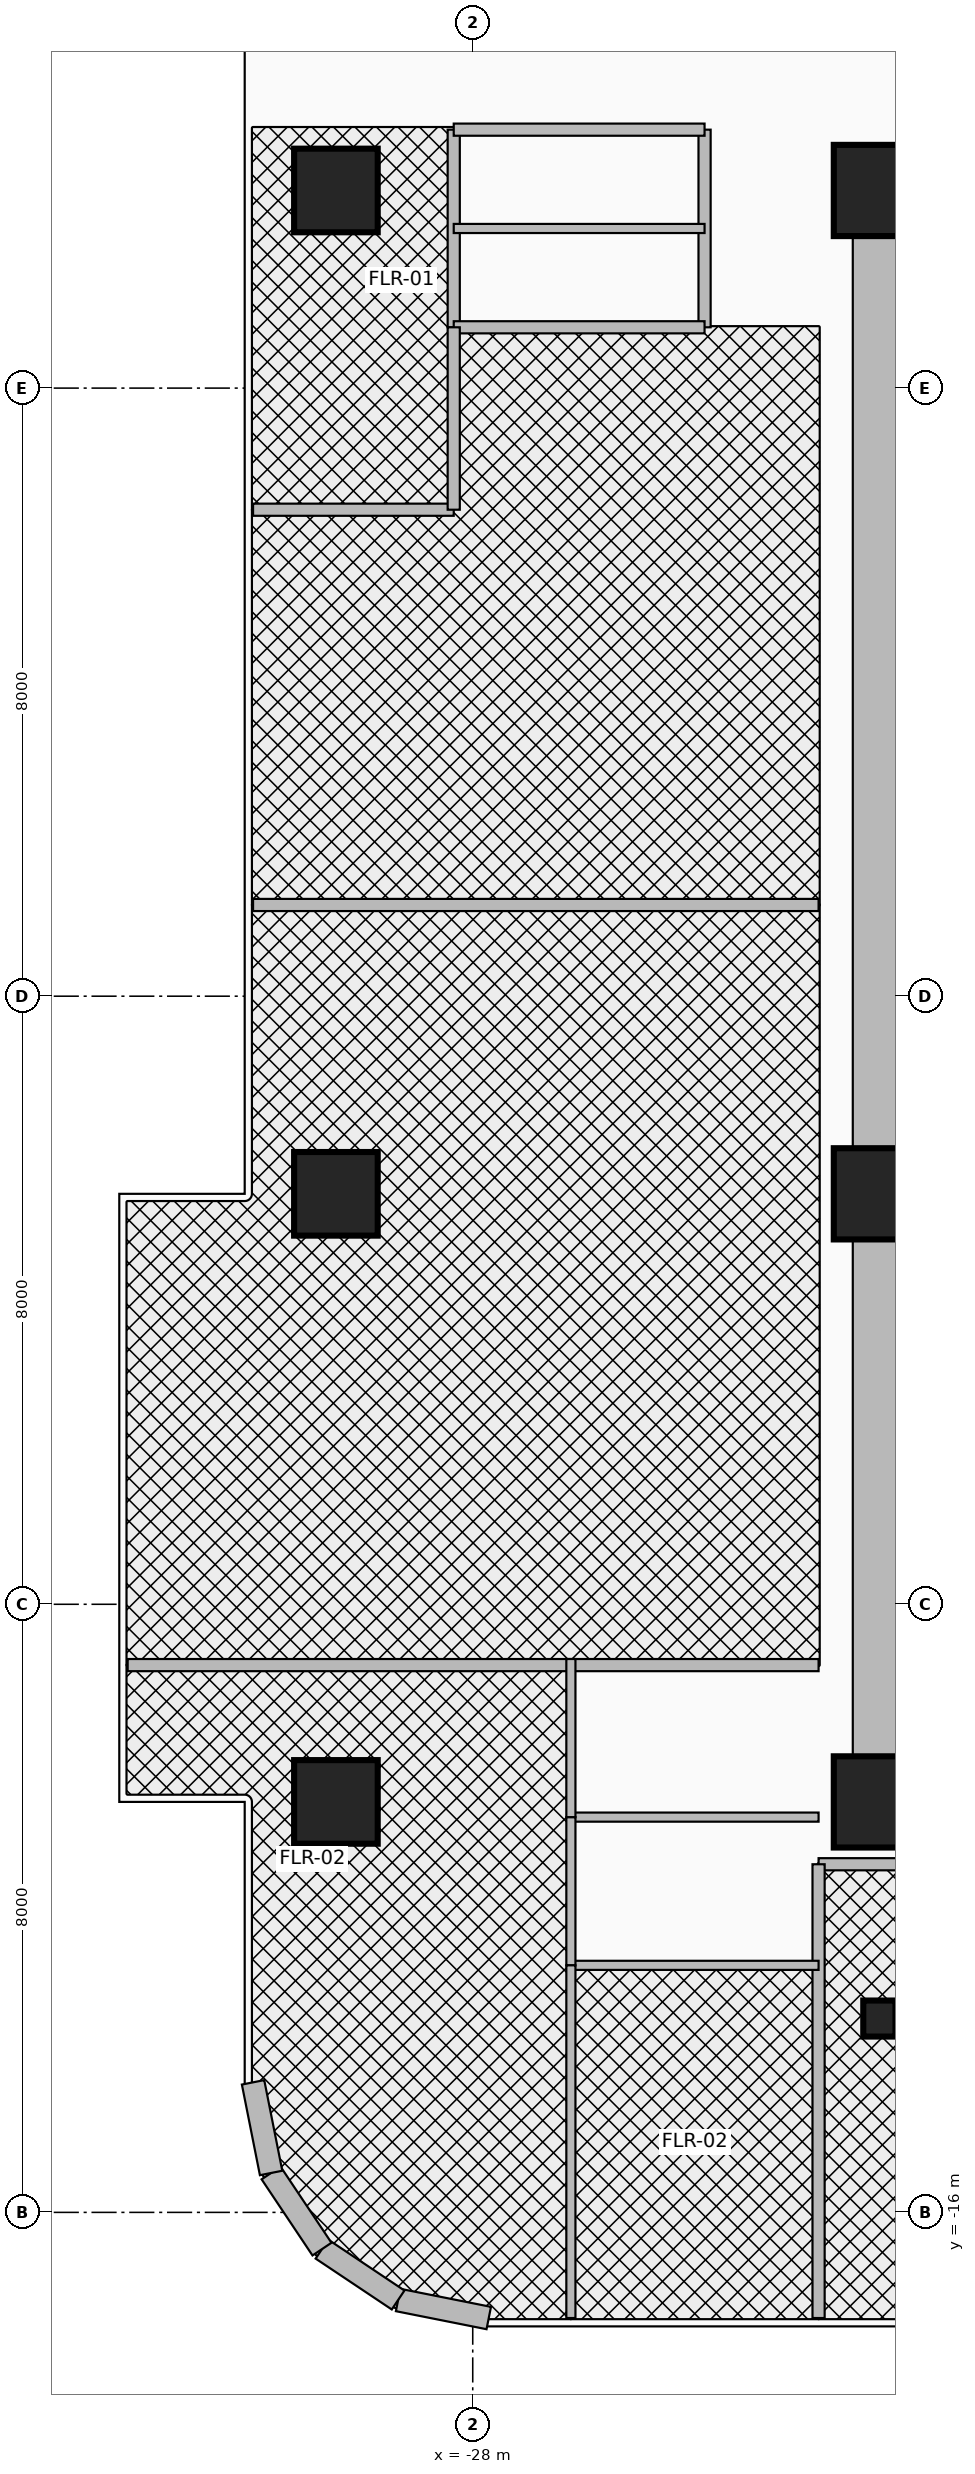
"""IFC4 building model, lengths in metres.
Left out: names, types, materials, properties, quantities, classifications, styles, units other than length and angle.
Written with IfcOpenShell. Run it as: python <this file> out.ifc"""

import sys

from ifc_helpers import new_model, si_unit, direction, frame, frame_2d, origin, origin_2d, place, context, subcontext, project, spatial, rectangle, circle, i_section, extrude, source, transform, mapped, element, fill, save


model = new_model("IFC4")
c1 = context("Model", 3, precision=1e-05, world=origin(), true_north=direction((0.0, 1.0)))
c2 = subcontext(c1, "Body", "Model", "MODEL_VIEW")
j1 = project(units=[si_unit("LENGTHUNIT", "METRE"), si_unit("PLANEANGLEUNIT", "RADIAN")], contexts=[c1])
p1 = place(None, origin())
s1 = spatial("IfcSite", under=j1, at=p1, CompositionType="ELEMENT")
p2 = place(p1, origin())
s2 = spatial("IfcBuilding", under=s1, at=p2, CompositionType="ELEMENT")
p3 = place(p2, frame((0.0, 0.0, 131.6)))
s3 = spatial("IfcBuildingStorey", under=s2, at=p3, CompositionType="ELEMENT", Elevation=131.6)
p4 = place(p3, frame((-22.65, -11.15, 0.0), z_axis=(0.0, 0.0, 1.0), x_axis=(0.0, 1.0, 0.0)))
e1 = element("IfcWall", 1, at=p4, inside=s3, PredefinedType="SHEAR", context=c2, shape_type="SweptSolid", body=[
    extrude(rectangle(XDim=22.3, YDim=0.7, at=frame_2d((11.15, 0.0))), origin(), (0.0, 0.0, 1.0), 3.46),
])
for number, where, z_axis, x_axis in (
    (2, (-22.65, 10.8, 0.0), (0.0, 0.0, 1.0), (1.0, 0.0, 0.0)),
    (3, (-22.65, -10.8, 0.0), (0.0, 0.0, 1.0), (1.0, 0.0, 0.0)),
):
    element("IfcWall", number, at=place(p3, frame(where, z_axis=z_axis, x_axis=x_axis)), inside=s3, PredefinedType="SHEAR", context=c2, shape_type="SweptSolid", body=[
        extrude(rectangle(XDim=10.25, YDim=0.7, at=frame_2d((5.125, 0.0))), origin(), (0.0, 0.0, 1.0), 3.46),
    ])
m1 = source(origin(), c2, "Body", "SweptSolid", [
    extrude(circle(Radius=0.55, at=origin_2d()), origin(), (0.0, 0.0, 1.0), 3.7),
])
p5 = place(p3, frame((-29.8, -10.6, 0.0), z_axis=(0.0, 0.0, 1.0), x_axis=(1.0, 0.0, 0.0)))
e4 = element("IfcColumn", 4, at=p5, inside=s3, PredefinedType="COLUMN", context=c2, shape_type="MappedRepresentation", body=[
    mapped(m1, transform((0.0, 0.0, 0.0), x_axis=(1.0, 0.0, 0.0), y_axis=(0.0, 1.0, 0.0), z_axis=(0.0, 0.0, 1.0), scale=1.0)),
])
m2 = source(origin(), c2, "Body", "SweptSolid", [
    extrude(rectangle(XDim=1.2, YDim=1.2, at=origin_2d()), origin(), (0.0, 0.0, 1.0), 3.7),
])
p6 = place(p3, frame((-22.65, -10.6, 0.0), z_axis=(0.0, 0.0, 1.0), x_axis=(1.0, 0.0, 0.0)))
e5 = element("IfcColumn", 5, at=p6, inside=s3, PredefinedType="COLUMN", context=c2, shape_type="MappedRepresentation", body=[
    mapped(m2, transform((0.0, 0.0, 0.0), x_axis=(1.0, 0.0, 0.0), y_axis=(0.0, 1.0, 0.0), z_axis=(0.0, 0.0, 1.0), scale=1.0)),
])
p7 = place(p3, frame((-29.8, -2.6, 0.0), z_axis=(0.0, 0.0, 1.0), x_axis=(1.0, 0.0, 0.0)))
e6 = element("IfcColumn", 6, at=p7, inside=s3, PredefinedType="COLUMN", context=c2, shape_type="MappedRepresentation", body=[
    mapped(m1, transform((0.0, 0.0, 0.0), x_axis=(1.0, 0.0, 0.0), y_axis=(0.0, 1.0, 0.0), z_axis=(0.0, 0.0, 1.0), scale=1.0)),
])
p8 = place(p3, frame((-22.65, -2.6, 0.0), z_axis=(0.0, 0.0, 1.0), x_axis=(1.0, 0.0, 0.0)))
e7 = element("IfcColumn", 7, at=p8, inside=s3, PredefinedType="COLUMN", context=c2, shape_type="MappedRepresentation", body=[
    mapped(m2, transform((0.0, 0.0, 0.0), x_axis=(1.0, 0.0, 0.0), y_axis=(0.0, 1.0, 0.0), z_axis=(0.0, 0.0, 1.0), scale=1.0)),
])
p9 = place(p3, frame((-29.8, 10.6, 0.0), z_axis=(0.0, 0.0, 1.0), x_axis=(1.0, 0.0, 0.0)))
e8 = element("IfcColumn", 8, at=p9, inside=s3, PredefinedType="COLUMN", context=c2, shape_type="MappedRepresentation", body=[
    mapped(m1, transform((0.0, 0.0, 0.0), x_axis=(1.0, 0.0, 0.0), y_axis=(0.0, 1.0, 0.0), z_axis=(0.0, 0.0, 1.0), scale=1.0)),
])
p10 = place(p3, frame((-22.65, 10.6, 0.0), z_axis=(0.0, 0.0, 1.0), x_axis=(1.0, 0.0, 0.0)))
e9 = element("IfcColumn", 9, at=p10, inside=s3, PredefinedType="COLUMN", context=c2, shape_type="MappedRepresentation", body=[
    mapped(m2, transform((0.0, 0.0, 0.0), x_axis=(1.0, 0.0, 0.0), y_axis=(0.0, 1.0, 0.0), z_axis=(0.0, 0.0, 1.0), scale=1.0)),
])
m3 = source(origin(), c2, "Body", "SweptSolid", [
    extrude(i_section(OverallWidth=0.424, OverallDepth=0.474, WebThickness=0.048, FlangeThickness=0.077, at=origin_2d()), origin(), (0.0, 0.0, 1.0), 3.7),
])
p11 = place(p3, frame((-22.65, -13.45, 0.0), z_axis=(0.0, 0.0, 1.0), x_axis=(1.0, 0.0, 0.0)))
e10 = element("IfcColumn", 10, at=p11, inside=s3, PredefinedType="COLUMN", context=c2, shape_type="MappedRepresentation", body=[
    mapped(m3, transform((0.0, 0.0, 0.0), x_axis=(1.0, 0.0, 0.0), y_axis=(0.0, 1.0, 0.0), z_axis=(0.0, 0.0, 1.0), scale=1.0)),
])
p12 = place(p3, frame((-27.789, -17.39, 0.0), z_axis=(0.0, 0.0, 1.0), x_axis=(-0.980804027463, 0.194996050505, 0.0)))
e11 = element("IfcWall", 11, at=p12, inside=s3, PredefinedType="SOLIDWALL", context=c2, shape_type="SweptSolid", body=[
    extrude(rectangle(XDim=1.216, YDim=0.3, at=frame_2d((0.608, 0.0))), origin(), (0.0, 0.0, 1.0), 3.46),
])
for number, where, z_axis, x_axis in (
    (12, (-28.982, -17.153, 0.0), (0.0, 0.0, 1.0), (-0.831, 0.556, 0.0)),
    (13, (-29.983, -16.483, 0.0), (0.0, 0.0, 1.0), (-0.556, 0.831, 0.0)),
):
    element("IfcWall", number, at=place(p3, frame(where, z_axis=z_axis, x_axis=x_axis)), inside=s3, PredefinedType="SOLIDWALL", context=c2, shape_type="SweptSolid", body=[
        extrude(rectangle(XDim=1.205, YDim=0.3, at=frame_2d((0.603, 0.0))), origin(), (0.0, 0.0, 1.0), 3.46),
    ])
p13 = place(p3, frame((-30.653, -15.482, 0.0), z_axis=(0.0, 0.0, 1.0), x_axis=(-0.194996050505, 0.980804027463, 0.0)))
e14 = element("IfcWall", 14, at=p13, inside=s3, PredefinedType="SOLIDWALL", context=c2, shape_type="SweptSolid", body=[
    extrude(rectangle(XDim=1.216, YDim=0.3, at=frame_2d((0.608, 0.0))), origin(), (0.0, 0.0, 1.0), 3.46),
])
p14 = place(p3, frame((-28.25, 8.8, 0.0), z_axis=(0.0, 0.0, 1.0), x_axis=(0.0, 1.0, 0.0)))
e15 = element("IfcWall", 15, at=p14, inside=s3, PredefinedType="PARTITIONING", context=c2, shape_type="SweptSolid", body=[
    extrude(rectangle(XDim=2.6, YDim=0.16, at=frame_2d((1.3, 0.0))), origin(), (0.0, 0.0, 1.0), 2.666),
])
p15 = place(p3, frame((-24.95, 8.8, 0.0), z_axis=(0.0, 0.0, 1.0), x_axis=(0.0, 1.0, 0.0)))
e16 = element("IfcWall", 16, at=p15, inside=s3, PredefinedType="PARTITIONING", context=c2, shape_type="SweptSolid", body=[
    extrude(rectangle(XDim=2.6, YDim=0.16, at=frame_2d((1.3, 0.0))), origin(), (0.0, 0.0, 1.0), 2.666),
])
p16 = place(p15, frame((0.3, 0.0, 0.0)))
e17 = element("IfcOpeningElement", 17, at=p16, cuts=e16, PredefinedType="OPENING", context=c2, shape_type="SweptSolid", body=[
    extrude(rectangle(XDim=0.85, YDim=2.1, at=frame_2d((0.425, 1.05))), frame((0.0, 0.095, 0.0), z_axis=(0.0, -1.0, 0.0), x_axis=(1.0, 0.0, 0.0)), (0.0, 0.0, 1.0), 0.19),
])
p17 = place(p15, frame((1.45, 0.0, 0.0)))
e18 = element("IfcOpeningElement", 18, at=p17, cuts=e16, PredefinedType="OPENING", context=c2, shape_type="SweptSolid", body=[
    extrude(rectangle(XDim=0.85, YDim=2.1, at=frame_2d((0.425, 1.05))), frame((0.0, 0.095, 0.0), z_axis=(0.0, -1.0, 0.0), x_axis=(1.0, 0.0, 0.0)), (0.0, 0.0, 1.0), 0.19),
])
for number, where, z_axis, x_axis in (
    (19, (-28.25, 8.8, 0.0), (0.0, 0.0, 1.0), (1.0, 0.0, 0.0)),
    (20, (-28.25, 11.4, 0.0), (0.0, 0.0, 1.0), (1.0, 0.0, 0.0)),
):
    element("IfcWall", number, at=place(p3, frame(where, z_axis=z_axis, x_axis=x_axis)), inside=s3, PredefinedType="PARTITIONING", context=c2, shape_type="SweptSolid", body=[
        extrude(rectangle(XDim=3.3, YDim=0.16, at=frame_2d((1.65, 0.0))), origin(), (0.0, 0.0, 1.0), 3.46),
    ])
p18 = place(p3, frame((-28.25, 10.1, 0.0), z_axis=(0.0, 0.0, 1.0), x_axis=(1.0, 0.0, 0.0)))
e21 = element("IfcWall", 21, at=p18, inside=s3, PredefinedType="PARTITIONING", context=c2, shape_type="SweptSolid", body=[
    extrude(rectangle(XDim=3.3, YDim=0.12, at=frame_2d((1.65, 0.0))), origin(), (0.0, 0.0, 1.0), 3.46),
])
p19 = place(p3, frame((-23.45, -11.42, 0.0), z_axis=(0.0, 0.0, 1.0), x_axis=(1.0, 0.0, 0.0)))
e22 = element("IfcWall", 22, at=p19, inside=s3, PredefinedType="PARTITIONING", context=c2, shape_type="SweptSolid", body=[
    extrude(rectangle(XDim=13.84, YDim=0.16, at=frame_2d((6.92, 0.0))), origin(), (0.0, 0.0, 1.0), 2.834),
])
p20 = place(p3, frame((-23.45, -17.39, 0.0), z_axis=(0.0, 0.0, 1.0), x_axis=(0.0, 1.0, 0.0)))
e23 = element("IfcWall", 23, at=p20, inside=s3, PredefinedType="PARTITIONING", context=c2, shape_type="SweptSolid", body=[
    extrude(rectangle(XDim=5.97, YDim=0.16, at=frame_2d((2.985, 0.0))), origin(), (0.0, 0.0, 1.0), 3.46),
])
p21 = place(p20, frame((2.535, 0.0, 0.0)))
e24 = element("IfcOpeningElement", 24, at=p21, cuts=e23, PredefinedType="OPENING", context=c2, shape_type="SweptSolid", body=[
    extrude(rectangle(XDim=0.9, YDim=2.1, at=frame_2d((0.45, 1.05))), frame((0.0, 0.095, 0.0), z_axis=(0.0, -1.0, 0.0), x_axis=(1.0, 0.0, 0.0)), (0.0, 0.0, 1.0), 0.19),
])
p22 = place(p3, frame((-32.54, -8.8, 0.0), z_axis=(0.0, 0.0, 1.0), x_axis=(1.0, 0.0, 0.0)))
e25 = element("IfcWall", 25, at=p22, inside=s3, PredefinedType="PARTITIONING", context=c2, shape_type="SweptSolid", body=[
    extrude(rectangle(XDim=9.09, YDim=0.16, at=frame_2d((4.545, 0.0))), origin(), (0.0, 0.0, 1.0), 2.896),
])
p23 = place(p22, frame((3.52, 0.0, 0.0)))
e26 = element("IfcOpeningElement", 26, at=p23, cuts=e25, PredefinedType="OPENING", context=c2, shape_type="SweptSolid", body=[
    extrude(rectangle(XDim=0.95, YDim=2.15, at=frame_2d((0.475, 1.075))), frame((0.0, 0.095, 0.0), z_axis=(0.0, -1.0, 0.0), x_axis=(1.0, 0.0, 0.0)), (0.0, 0.0, 1.0), 0.19),
])
p24 = place(p3, frame((-30.89, 6.4, 0.0), z_axis=(0.0, 0.0, 1.0), x_axis=(1.0, 0.0, 0.0)))
e27 = element("IfcWall", 27, at=p24, inside=s3, PredefinedType="PARTITIONING", context=c2, shape_type="SweptSolid", body=[
    extrude(rectangle(XDim=2.64, YDim=0.16, at=frame_2d((1.32, 0.0))), origin(), (0.0, 0.0, 1.0), 2.896),
])
p25 = place(p24, frame((0.87, 0.0, 0.0)))
e28 = element("IfcOpeningElement", 28, at=p25, cuts=e27, PredefinedType="OPENING", context=c2, shape_type="SweptSolid", body=[
    extrude(rectangle(XDim=0.9, YDim=2.1, at=frame_2d((0.45, 1.05))), frame((0.0, 0.095, 0.0), z_axis=(0.0, -1.0, 0.0), x_axis=(1.0, 0.0, 0.0)), (0.0, 0.0, 1.0), 0.19),
])
p26 = place(p3, frame((-28.25, 6.4, 0.0), z_axis=(0.0, 0.0, 1.0), x_axis=(0.0, 1.0, 0.0)))
e29 = element("IfcWall", 29, at=p26, inside=s3, PredefinedType="PARTITIONING", context=c2, shape_type="SweptSolid", body=[
    extrude(rectangle(XDim=2.4, YDim=0.16, at=frame_2d((1.2, 0.0))), origin(), (0.0, 0.0, 1.0), 2.988),
])
p27 = place(p3, frame((-26.708, -10.8, 0.0), z_axis=(0.0, 0.0, 1.0), x_axis=(1.0, 0.0, 0.0)))
e30 = element("IfcWall", 30, at=p27, inside=s3, PredefinedType="PARTITIONING", context=c2, shape_type="SweptSolid", body=[
    extrude(rectangle(XDim=3.259, YDim=0.12, at=frame_2d((1.629, 0.0))), origin(), (0.0, 0.0, 1.0), 2.666),
])
p28 = place(p3, frame((-26.708, -12.75, 0.0), z_axis=(0.0, 0.0, 1.0), x_axis=(1.0, 0.0, 0.0)))
e31 = element("IfcWall", 31, at=p28, inside=s3, PredefinedType="PARTITIONING", context=c2, shape_type="SweptSolid", body=[
    extrude(rectangle(XDim=3.259, YDim=0.12, at=frame_2d((1.629, 0.0))), origin(), (0.0, 0.0, 1.0), 3.46),
])
p29 = place(p3, frame((-26.708, -12.75, 0.0), z_axis=(0.0, 0.0, 1.0), x_axis=(0.0, 1.0, 0.0)))
e32 = element("IfcWall", 32, at=p29, inside=s3, PredefinedType="PARTITIONING", context=c2, shape_type="SweptSolid", body=[
    extrude(rectangle(XDim=1.95, YDim=0.12, at=frame_2d((0.975, 0.0))), origin(), (0.0, 0.0, 1.0), 2.666),
])
p30 = place(p29, frame((0.55, 0.0, 0.0)))
e33 = element("IfcOpeningElement", 33, at=p30, cuts=e32, PredefinedType="OPENING", context=c2, shape_type="SweptSolid", body=[
    extrude(rectangle(XDim=0.85, YDim=2.1, at=frame_2d((0.425, 1.05))), frame((0.0, 0.075, 0.0), z_axis=(0.0, -1.0, 0.0), x_axis=(1.0, 0.0, 0.0)), (0.0, 0.0, 1.0), 0.15),
])
p31 = place(p3, frame((-26.708, -10.8, 0.0), z_axis=(0.0, 0.0, 1.0), x_axis=(0.0, 1.0, 0.0)))
e34 = element("IfcWall", 34, at=p31, inside=s3, PredefinedType="PARTITIONING", context=c2, shape_type="SweptSolid", body=[
    extrude(rectangle(XDim=2.08, YDim=0.12, at=frame_2d((1.04, 0.0))), origin(), (0.0, 0.0, 1.0), 2.666),
])
p32 = place(p31, frame((0.55, 0.0, 0.0)))
e35 = element("IfcOpeningElement", 35, at=p32, cuts=e34, PredefinedType="OPENING", context=c2, shape_type="SweptSolid", body=[
    extrude(rectangle(XDim=0.9, YDim=2.1, at=frame_2d((0.45, 1.05))), frame((0.0, 0.075, 0.0), z_axis=(0.0, -1.0, 0.0), x_axis=(1.0, 0.0, 0.0)), (0.0, 0.0, 1.0), 0.15),
])
p33 = place(p3, frame((-26.708, -17.39, 0.0), z_axis=(0.0, 0.0, 1.0), x_axis=(0.0, 1.0, 0.0)))
e36 = element("IfcWall", 36, at=p33, inside=s3, PredefinedType="PARTITIONING", context=c2, shape_type="SweptSolid", body=[
    extrude(rectangle(XDim=4.64, YDim=0.12, at=frame_2d((2.32, 0.0))), origin(), (0.0, 0.0, 1.0), 3.46),
])
p34 = place(p33, frame((1.87, 0.0, 0.0)))
e37 = element("IfcOpeningElement", 37, at=p34, cuts=e36, PredefinedType="OPENING", context=c2, shape_type="SweptSolid", body=[
    extrude(rectangle(XDim=0.9, YDim=2.1, at=frame_2d((0.45, 1.05))), frame((0.0, 0.075, 0.0), z_axis=(0.0, -1.0, 0.0), x_axis=(1.0, 0.0, 0.0)), (0.0, 0.0, 1.0), 0.15),
])
p35 = place(p3, frame((-30.89, 1.2, 0.0), z_axis=(0.0, 0.0, 1.0), x_axis=(1.0, 0.0, 0.0)))
e38 = element("IfcWall", 38, at=p35, inside=s3, PredefinedType="PARTITIONING", context=c2, shape_type="SweptSolid", body=[
    extrude(rectangle(XDim=7.44, YDim=0.16, at=frame_2d((3.72, 0.0))), origin(), (0.0, 0.0, 1.0), 2.896),
])
p36 = place(p35, frame((3.2, 0.0, 0.0)))
e39 = element("IfcOpeningElement", 39, at=p36, cuts=e38, PredefinedType="OPENING", context=c2, shape_type="SweptSolid", body=[
    extrude(rectangle(XDim=1.8, YDim=2.15, at=frame_2d((0.9, 1.075))), frame((0.0, 0.095, 0.0), z_axis=(0.0, -1.0, 0.0), x_axis=(1.0, 0.0, 0.0)), (0.0, 0.0, 1.0), 0.19),
])
p37 = place(p16, origin())
e40 = element("IfcDoor", 40, at=p37, inside=s3, OperationType="SINGLE_SWING_LEFT", PredefinedType="DOOR", context=c2, shape_type="SweptSolid", body=[
    extrude(rectangle(XDim=0.85, YDim=2.1, at=frame_2d((0.425, 1.05))), frame((0.0, 0.025, 0.0), z_axis=(0.0, -1.0, 0.0), x_axis=(1.0, 0.0, 0.0)), (0.0, 0.0, 1.0), 0.05),
])
fill(e17, e40)
p38 = place(p17, origin())
e41 = element("IfcDoor", 41, at=p38, inside=s3, OperationType="SINGLE_SWING_RIGHT", PredefinedType="DOOR", context=c2, shape_type="SweptSolid", body=[
    extrude(rectangle(XDim=0.85, YDim=2.1, at=frame_2d((0.425, 1.05))), frame((0.0, 0.025, 0.0), z_axis=(0.0, -1.0, 0.0), x_axis=(1.0, 0.0, 0.0)), (0.0, 0.0, 1.0), 0.05),
])
fill(e18, e41)
p39 = place(p23, frame((0.95, 0.0, 0.0), z_axis=(0.0, 0.0, 1.0), x_axis=(-1.0, 0.0, 0.0)))
e42 = element("IfcDoor", 42, at=p39, inside=s3, OperationType="SINGLE_SWING_LEFT", PredefinedType="DOOR", context=c2, shape_type="SweptSolid", body=[
    extrude(rectangle(XDim=0.95, YDim=2.15, at=frame_2d((0.475, 1.075))), frame((0.0, 0.025, 0.0), z_axis=(0.0, -1.0, 0.0), x_axis=(1.0, 0.0, 0.0)), (0.0, 0.0, 1.0), 0.05),
])
fill(e26, e42)
p40 = place(p30, origin())
e43 = element("IfcDoor", 43, at=p40, inside=s3, OperationType="SINGLE_SWING_RIGHT", PredefinedType="DOOR", context=c2, shape_type="SweptSolid", body=[
    extrude(rectangle(XDim=0.85, YDim=2.1, at=frame_2d((0.425, 1.05))), frame((0.0, 0.025, 0.0), z_axis=(0.0, -1.0, 0.0), x_axis=(1.0, 0.0, 0.0)), (0.0, 0.0, 1.0), 0.05),
])
fill(e33, e43)
p41 = place(p32, origin())
e44 = element("IfcDoor", 44, at=p41, inside=s3, OperationType="SINGLE_SWING_LEFT", PredefinedType="DOOR", context=c2, shape_type="SweptSolid", body=[
    extrude(rectangle(XDim=0.9, YDim=2.1, at=frame_2d((0.45, 1.05))), frame((0.0, 0.025, 0.0), z_axis=(0.0, -1.0, 0.0), x_axis=(1.0, 0.0, 0.0)), (0.0, 0.0, 1.0), 0.05),
])
fill(e35, e44)
p42 = place(p34, origin())
e45 = element("IfcDoor", 45, at=p42, inside=s3, OperationType="SINGLE_SWING_RIGHT", PredefinedType="DOOR", context=c2, shape_type="SweptSolid", body=[
    extrude(rectangle(XDim=0.9, YDim=2.1, at=frame_2d((0.45, 1.05))), frame((0.0, 0.025, 0.0), z_axis=(0.0, -1.0, 0.0), x_axis=(1.0, 0.0, 0.0)), (0.0, 0.0, 1.0), 0.05),
])
fill(e37, e45)
p43 = place(p25, frame((0.9, 0.0, 0.0), z_axis=(0.0, 0.0, 1.0), x_axis=(-1.0, 0.0, 0.0)))
e46 = element("IfcDoor", 46, at=p43, inside=s3, OperationType="SINGLE_SWING_LEFT", PredefinedType="DOOR", context=c2, shape_type="SweptSolid", body=[
    extrude(rectangle(XDim=0.9, YDim=2.1, at=frame_2d((0.45, 1.05))), frame((0.0, 0.025, 0.0), z_axis=(0.0, -1.0, 0.0), x_axis=(1.0, 0.0, 0.0)), (0.0, 0.0, 1.0), 0.05),
])
fill(e28, e46)
p44 = place(p36, origin())
e47 = element("IfcDoor", 47, at=p44, inside=s3, OperationType="DOUBLE_DOOR_SINGLE_SWING", PredefinedType="DOOR", context=c2, shape_type="SweptSolid", body=[
    extrude(rectangle(XDim=1.8, YDim=2.15, at=frame_2d((0.9, 1.075))), frame((0.0, 0.025, 0.0), z_axis=(0.0, -1.0, 0.0), x_axis=(1.0, 0.0, 0.0)), (0.0, 0.0, 1.0), 0.05),
])
fill(e39, e47)
p45 = place(p21, frame((0.9, 0.0, 0.0), z_axis=(0.0, 0.0, 1.0), x_axis=(-1.0, 0.0, 0.0)))
e48 = element("IfcDoor", 48, at=p45, inside=s3, OperationType="SINGLE_SWING_LEFT", PredefinedType="DOOR", context=c2, shape_type="SweptSolid", body=[
    extrude(rectangle(XDim=0.9, YDim=2.1, at=frame_2d((0.45, 1.05))), frame((0.0, 0.025, 0.0), z_axis=(0.0, -1.0, 0.0), x_axis=(1.0, 0.0, 0.0)), (0.0, 0.0, 1.0), 0.05),
])
fill(e24, e48)
save(model, sys.argv[1])
